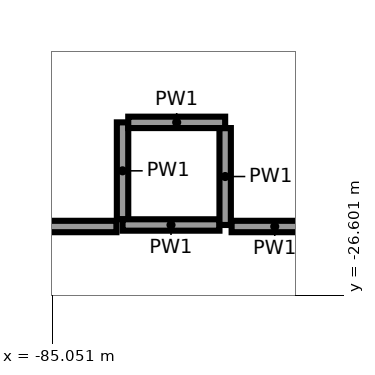
"""IFC4 building model, lengths in metres.
Left out: names, types, materials, properties, quantities, classifications, styles, units other than length and angle.
Written with IfcOpenShell. Run it as: python <this file> out.ifc"""

import sys

from ifc_helpers import new_model, si_unit, direction, frame, frame_2d, origin, place, context, subcontext, project, spatial, rectangle, extrude, element, save


model = new_model("IFC4")
c1 = context("Model", 3, precision=1e-05, world=origin(), true_north=direction((0.0, 1.0)))
c2 = subcontext(c1, "Body", "Model", "MODEL_VIEW")
j1 = project(units=[si_unit("LENGTHUNIT", "METRE"), si_unit("PLANEANGLEUNIT", "RADIAN")], contexts=[c1])
p1 = place(None, origin())
s1 = spatial("IfcSite", under=j1, at=p1, CompositionType="ELEMENT")
p2 = place(p1, origin())
s2 = spatial("IfcBuilding", under=s1, at=p2, CompositionType="ELEMENT")
p3 = place(p2, frame((0.0, 0.0, 18.0)))
s3 = spatial("IfcBuildingStorey", under=s2, at=p3, CompositionType="ELEMENT", Elevation=18.0)
p4 = place(p3, frame((-84.125, -24.325, 0.0), z_axis=(0.0, 0.0, 1.0), x_axis=(0.0, -1.0, 0.0)))
e1 = element("IfcWall", 1, at=p4, inside=s3, PredefinedType="PARTITIONING", context=c2, shape_type="SweptSolid", body=[
    extrude(rectangle(XDim=1.275, YDim=0.15, at=frame_2d((0.638, 0.0))), origin(), (0.0, 0.0, 1.0), 5.6),
])
p5 = place(p3, frame((-84.125, -25.675, 0.0), z_axis=(0.0, 0.0, 1.0), x_axis=(1.0, 0.0, 0.0)))
e2 = element("IfcWall", 2, at=p5, inside=s3, PredefinedType="PARTITIONING", context=c2, shape_type="SweptSolid", body=[
    extrude(rectangle(XDim=1.275, YDim=0.15, at=frame_2d((0.637, 0.0))), origin(), (0.0, 0.0, 1.0), 5.6),
])
for number, where, z_axis, x_axis in (
    (3, (-82.775, -25.675, 0.0), (0.0, 0.0, 1.0), (0.0, 1.0, 0.0)),
    (4, (-82.775, -24.325, 0.0), (0.0, 0.0, 1.0), (-1.0, 0.0, 0.0)),
):
    element("IfcWall", number, at=place(p3, frame(where, z_axis=z_axis, x_axis=x_axis)), inside=s3, PredefinedType="PARTITIONING", context=c2, shape_type="SweptSolid", body=[
        extrude(rectangle(XDim=1.275, YDim=0.15, at=frame_2d((0.638, 0.0))), origin(), (0.0, 0.0, 1.0), 5.6),
    ])
p6 = place(p3, frame((-87.909, -25.695, 0.0), z_axis=(0.0, 0.0, 1.0), x_axis=(1.0, 0.0, 0.0)))
e5 = element("IfcWall", 5, at=p6, inside=s3, PredefinedType="PARTITIONING", context=c2, shape_type="SweptSolid", body=[
    extrude(rectangle(XDim=3.704, YDim=0.15, at=frame_2d((1.852, 0.0))), origin(), (0.0, 0.0, 1.0), 4.5),
])
p7 = place(p6, frame((0.65, 0.0, 0.0)))
e6 = element("IfcOpeningElement", 6, at=p7, cuts=e5, PredefinedType="OPENING", context=c2, shape_type="SweptSolid", body=[
    extrude(rectangle(XDim=1.8, YDim=2.1, at=frame_2d((0.9, 1.05))), frame((0.0, 0.085, 0.0), z_axis=(0.0, -1.0, 0.0), x_axis=(1.0, 0.0, 0.0)), (0.0, 0.0, 1.0), 0.17),
])
p8 = place(p3, frame((-82.69, -25.695, 0.0), z_axis=(0.0, 0.0, 1.0), x_axis=(1.0, 0.0, 0.0)))
e7 = element("IfcWall", 7, at=p8, inside=s3, PredefinedType="PARTITIONING", context=c2, shape_type="SweptSolid", body=[
    extrude(rectangle(XDim=1.135, YDim=0.15, at=frame_2d((0.567, 0.0))), origin(), (0.0, 0.0, 1.0), 5.6),
])
save(model, sys.argv[1])
